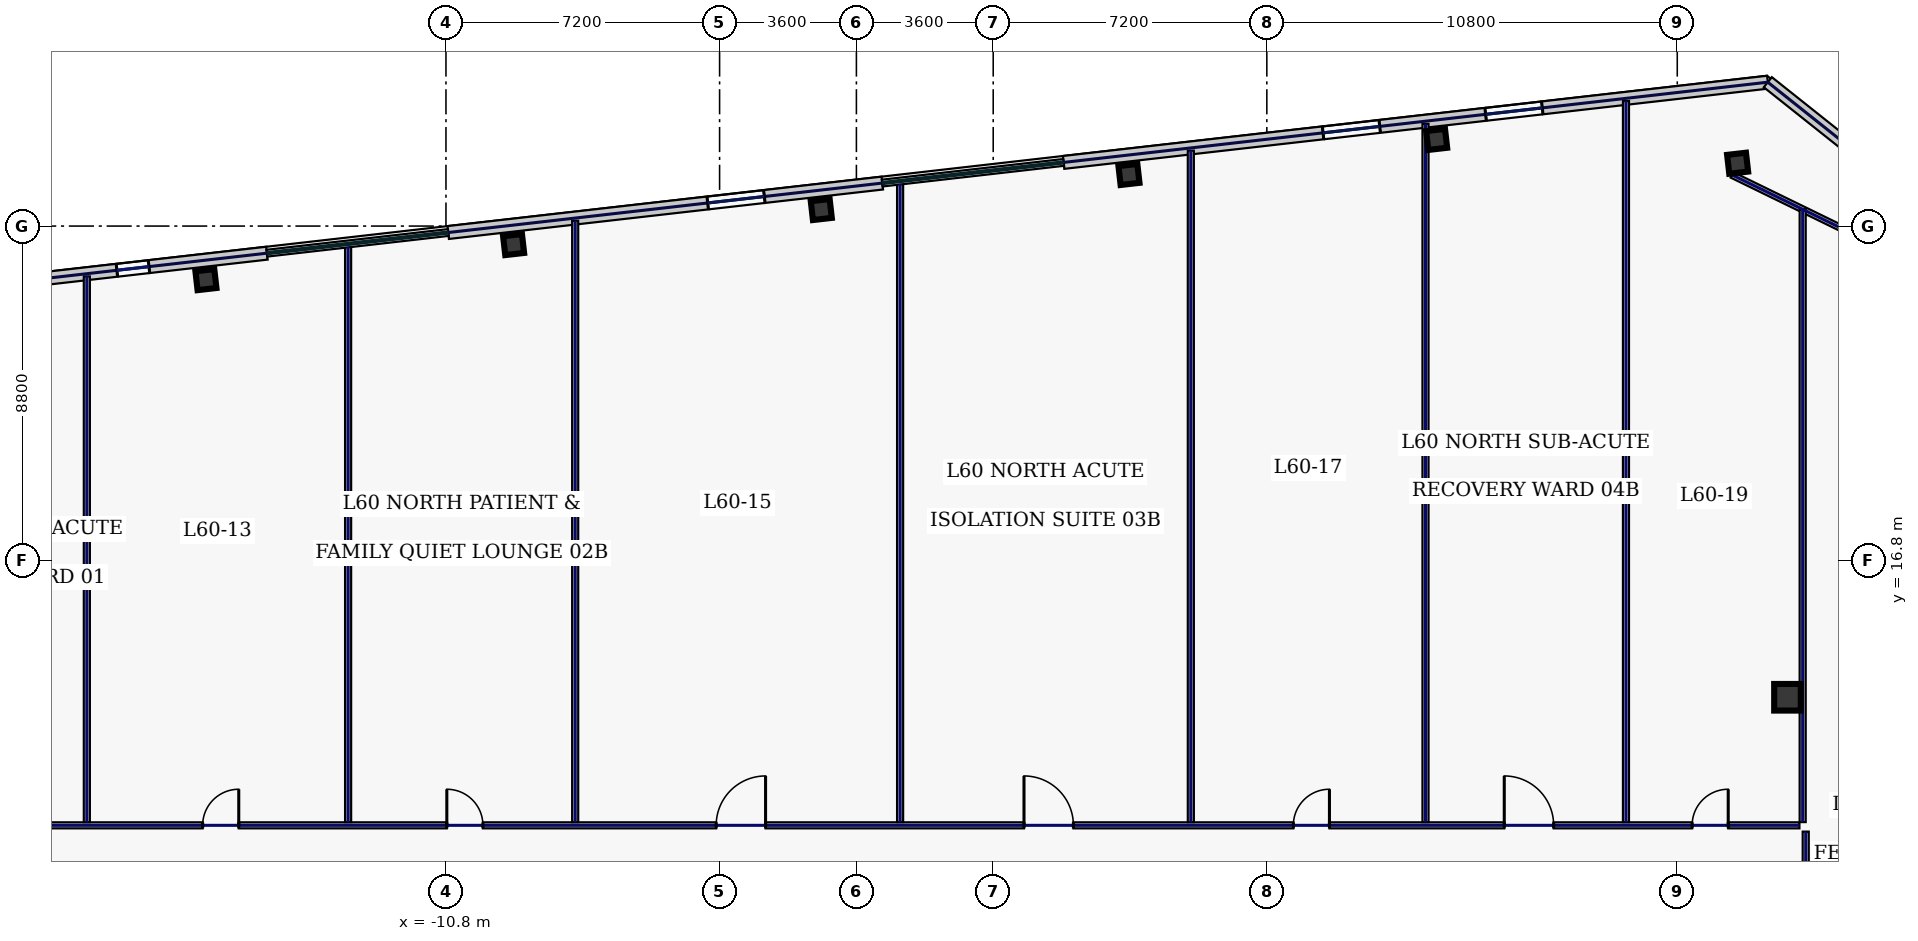
"""IFC4 building model, lengths in metres.
Left out: names, types, materials, properties, quantities, classifications, styles, units other than length and angle.
Written with IfcOpenShell. Run it as: python <this file> out.ifc"""

import sys

from ifc_helpers import new_model, si_unit, direction, frame, frame_2d, origin, origin_2d, place, context, subcontext, project, spatial, rectangle, hollow_rectangle, extrude, element, fill, save


model = new_model("IFC4")
c1 = context("Model", 3, precision=1e-05, world=origin(), true_north=direction((0.0, 1.0)))
c2 = subcontext(c1, "Body", "Model", "MODEL_VIEW")
j1 = project(units=[si_unit("LENGTHUNIT", "METRE"), si_unit("PLANEANGLEUNIT", "RADIAN")], contexts=[c1])
p1 = place(None, origin())
s1 = spatial("IfcSite", under=j1, at=p1, CompositionType="ELEMENT")
p2 = place(p1, origin())
s2 = spatial("IfcBuilding", under=s1, at=p2, CompositionType="ELEMENT")
p3 = place(p2, frame((0.0, 0.0, 259.0)))
s3 = spatial("IfcBuildingStorey", under=s2, at=p3, CompositionType="ELEMENT", Elevation=259.0)
p4 = place(p3, frame((24.5, 13.2, 0.0), z_axis=(0.0, 0.0, 1.0), x_axis=(1.0, 0.0, 0.0)))
e1 = element("IfcColumn", 1, at=p4, inside=s3, PredefinedType="COLUMN", context=c2, shape_type="SweptSolid", body=[
    extrude(hollow_rectangle(XDim=0.7, YDim=0.7, WallThickness=0.032, at=origin_2d()), origin(), (0.0, 0.0, 1.0), 3.74),
])
for number, where, z_axis, x_axis in (
    (2, (23.188, 27.253, 0.0), (0.0, 0.0, 1.0), (0.994, 0.113, 0.0)),
    (3, (15.269, 27.88, 0.0), (0.0, 0.0, 1.0), (0.994, 0.113, 0.0)),
    (4, (7.172, 26.958, 0.0), (0.0, 0.0, 1.0), (0.994, 0.113, 0.0)),
    (5, (-0.924, 26.035, 0.0), (0.0, 0.0, 1.0), (0.994, 0.113, 0.0)),
    (6, (-9.02, 25.113, 0.0), (0.0, 0.0, 1.0), (0.994, 0.113, 0.0)),
    (7, (-17.116, 24.19, 0.0), (0.0, 0.0, 1.0), (0.994, 0.113, 0.0)),
):
    element("IfcColumn", number, at=place(p3, frame(where, z_axis=z_axis, x_axis=x_axis)), inside=s3, PredefinedType="COLUMN", context=c2, shape_type="SweptSolid", body=[
        extrude(hollow_rectangle(XDim=0.5, YDim=0.5, WallThickness=0.025, at=origin_2d()), origin(), (0.0, 0.0, 1.0), 3.74),
    ])
p5 = place(p3, frame((23.983, 29.386, 0.0), z_axis=(0.0, 0.0, 1.0), x_axis=(-0.993572271362, -0.113199565282, 0.0)))
e8 = element("IfcWall", 8, at=p5, inside=s3, PredefinedType="STANDARD", context=c2, shape_type="SweptSolid", body=[
    extrude(rectangle(XDim=18.651, YDim=0.34, at=frame_2d((9.326, 0.0))), origin(), (0.0, 0.0, 1.0), 3.74),
])
p6 = place(p5, frame((10.279, 0.0, 0.83)))
e9 = element("IfcOpeningElement", 9, at=p6, cuts=e8, PredefinedType="OPENING", context=c2, shape_type="SweptSolid", body=[
    extrude(rectangle(XDim=1.5, YDim=2.0, at=frame_2d((0.75, 1.0))), frame((0.0, 0.18, 0.0), z_axis=(0.0, -1.0, 0.0), x_axis=(1.0, 0.0, 0.0)), (0.0, 0.0, 1.0), 0.36),
])
p7 = place(p5, frame((5.973, 0.0, 0.83)))
e10 = element("IfcOpeningElement", 10, at=p7, cuts=e8, PredefinedType="OPENING", context=c2, shape_type="SweptSolid", body=[
    extrude(rectangle(XDim=1.5, YDim=2.0, at=frame_2d((0.75, 1.0))), frame((0.0, 0.18, 0.0), z_axis=(0.0, -1.0, 0.0), x_axis=(1.0, 0.0, 0.0)), (0.0, 0.0, 1.0), 0.36),
])
p8 = place(p3, frame((0.682, 26.731, 0.0), z_axis=(0.0, 0.0, 1.0), x_axis=(-0.993571968199, -0.113202226169, 0.0)))
e11 = element("IfcWall", 11, at=p8, inside=s3, PredefinedType="STANDARD", context=c2, shape_type="SweptSolid", body=[
    extrude(rectangle(XDim=11.497, YDim=0.34, at=frame_2d((5.749, 0.0))), origin(), (0.0, 0.0, 1.0), 3.74),
])
p9 = place(p8, frame((3.125, 0.0, 0.83)))
e12 = element("IfcOpeningElement", 12, at=p9, cuts=e11, PredefinedType="OPENING", context=c2, shape_type="SweptSolid", body=[
    extrude(rectangle(XDim=1.5, YDim=2.0, at=frame_2d((0.75, 1.0))), frame((0.0, 0.18, 0.0), z_axis=(0.0, -1.0, 0.0), x_axis=(1.0, 0.0, 0.0)), (0.0, 0.0, 1.0), 0.36),
])
p10 = place(p3, frame((-15.51, 24.886, 0.0), z_axis=(0.0, 0.0, 1.0), x_axis=(-0.993572271362, -0.113199565282, 0.0)))
e13 = element("IfcWall", 13, at=p10, inside=s3, PredefinedType="STANDARD", context=c2, shape_type="SweptSolid", body=[
    extrude(rectangle(XDim=18.651, YDim=0.34, at=frame_2d((9.326, 0.0))), origin(), (0.0, 0.0, 1.0), 3.74),
])
p11 = place(p10, frame((15.021, 0.0, 0.83)))
e14 = element("IfcOpeningElement", 14, at=p11, cuts=e13, PredefinedType="OPENING", context=c2, shape_type="SweptSolid", body=[
    extrude(rectangle(XDim=1.5, YDim=2.0, at=frame_2d((0.75, 1.0))), frame((0.0, 0.18, 0.0), z_axis=(0.0, -1.0, 0.0), x_axis=(1.0, 0.0, 0.0)), (0.0, 0.0, 1.0), 0.36),
])
p12 = place(p10, frame((11.273, 0.0, 0.83)))
e15 = element("IfcOpeningElement", 15, at=p12, cuts=e13, PredefinedType="OPENING", context=c2, shape_type="SweptSolid", body=[
    extrude(rectangle(XDim=1.5, YDim=2.0, at=frame_2d((0.75, 1.0))), frame((0.0, 0.18, 0.0), z_axis=(0.0, -1.0, 0.0), x_axis=(1.0, 0.0, 0.0)), (0.0, 0.0, 1.0), 0.36),
])
p13 = place(p10, frame((6.873, 0.0, 0.83)))
e16 = element("IfcOpeningElement", 16, at=p13, cuts=e13, PredefinedType="OPENING", context=c2, shape_type="SweptSolid", body=[
    extrude(rectangle(XDim=1.5, YDim=2.0, at=frame_2d((0.75, 1.0))), frame((0.0, 0.18, 0.0), z_axis=(0.0, -1.0, 0.0), x_axis=(1.0, 0.0, 0.0)), (0.0, 0.0, 1.0), 0.36),
])
p14 = place(p10, frame((3.125, 0.0, 0.83)))
e17 = element("IfcOpeningElement", 17, at=p14, cuts=e13, PredefinedType="OPENING", context=c2, shape_type="SweptSolid", body=[
    extrude(rectangle(XDim=0.85, YDim=1.85, at=frame_2d((0.425, 0.925))), frame((0.0, 0.18, 0.0), z_axis=(0.0, -1.0, 0.0), x_axis=(1.0, 0.0, 0.0)), (0.0, 0.0, 1.0), 0.36),
])
p15 = place(p3, frame((29.107, 25.31, 0.0), z_axis=(0.0, 0.0, 1.0), x_axis=(-0.78259733853, 0.62252823689, 0.0)))
e18 = element("IfcWall", 18, at=p15, inside=s3, PredefinedType="STANDARD", context=c2, shape_type="SweptSolid", body=[
    extrude(rectangle(XDim=6.548, YDim=0.34, at=frame_2d((3.274, 0.0))), origin(), (0.0, 0.0, 1.0), 3.74),
])
p16 = place(p3, frame((28.528, 24.271, 0.0), z_axis=(0.0, 0.0, 1.0), x_axis=(-0.898820692789, 0.438316509173, 0.0)))
e19 = element("IfcWall", 19, at=p16, inside=s3, PredefinedType="PARTITIONING", context=c2, shape_type="SweptSolid", body=[
    extrude(rectangle(XDim=6.107, YDim=0.16, at=frame_2d((3.053, 0.0))), origin(), (0.0, 0.0, 1.0), 3.74),
])
p17 = place(p3, frame((-24.815, 9.83, 0.0), z_axis=(0.0, 0.0, 1.0), x_axis=(1.0, 0.0, 0.0)))
e20 = element("IfcWall", 20, at=p17, inside=s3, PredefinedType="PARTITIONING", context=c2, shape_type="SweptSolid", body=[
    extrude(rectangle(XDim=49.63, YDim=0.16, at=frame_2d((24.815, 0.0))), origin(), (0.0, 0.0, 1.0), 3.74),
])
p18 = place(p17, frame((1.869, 0.0, 0.0)))
e21 = element("IfcOpeningElement", 21, at=p18, cuts=e20, PredefinedType="OPENING", context=c2, shape_type="SweptSolid", body=[
    extrude(rectangle(XDim=1.3, YDim=2.2, at=frame_2d((0.65, 1.1))), frame((0.0, 0.09, 0.0), z_axis=(0.0, -1.0, 0.0), x_axis=(1.0, 0.0, 0.0)), (0.0, 0.0, 1.0), 0.18),
])
p19 = place(p17, frame((7.613, 0.0, 0.0)))
e22 = element("IfcOpeningElement", 22, at=p19, cuts=e20, PredefinedType="OPENING", context=c2, shape_type="SweptSolid", body=[
    extrude(rectangle(XDim=0.95, YDim=2.2, at=frame_2d((0.475, 1.1))), frame((0.0, 0.09, 0.0), z_axis=(0.0, -1.0, 0.0), x_axis=(1.0, 0.0, 0.0)), (0.0, 0.0, 1.0), 0.18),
])
p20 = place(p17, frame((14.038, 0.0, 0.0)))
e23 = element("IfcOpeningElement", 23, at=p20, cuts=e20, PredefinedType="OPENING", context=c2, shape_type="SweptSolid", body=[
    extrude(rectangle(XDim=0.95, YDim=2.2, at=frame_2d((0.475, 1.1))), frame((0.0, 0.09, 0.0), z_axis=(0.0, -1.0, 0.0), x_axis=(1.0, 0.0, 0.0)), (0.0, 0.0, 1.0), 0.18),
])
p21 = place(p17, frame((21.125, 0.0, 0.0)))
e24 = element("IfcOpeningElement", 24, at=p21, cuts=e20, PredefinedType="OPENING", context=c2, shape_type="SweptSolid", body=[
    extrude(rectangle(XDim=1.3, YDim=2.2, at=frame_2d((0.65, 1.1))), frame((0.0, 0.09, 0.0), z_axis=(0.0, -1.0, 0.0), x_axis=(1.0, 0.0, 0.0)), (0.0, 0.0, 1.0), 0.18),
])
p22 = place(p17, frame((29.225, 0.0, 0.0)))
e25 = element("IfcOpeningElement", 25, at=p22, cuts=e20, PredefinedType="OPENING", context=c2, shape_type="SweptSolid", body=[
    extrude(rectangle(XDim=1.3, YDim=2.2, at=frame_2d((0.65, 1.1))), frame((0.0, 0.09, 0.0), z_axis=(0.0, -1.0, 0.0), x_axis=(1.0, 0.0, 0.0)), (0.0, 0.0, 1.0), 0.18),
])
p23 = place(p17, frame((36.312, 0.0, 0.0)))
e26 = element("IfcOpeningElement", 26, at=p23, cuts=e20, PredefinedType="OPENING", context=c2, shape_type="SweptSolid", body=[
    extrude(rectangle(XDim=0.95, YDim=2.2, at=frame_2d((0.475, 1.1))), frame((0.0, 0.09, 0.0), z_axis=(0.0, -1.0, 0.0), x_axis=(1.0, 0.0, 0.0)), (0.0, 0.0, 1.0), 0.18),
])
p24 = place(p17, frame((41.863, 0.0, 0.0)))
e27 = element("IfcOpeningElement", 27, at=p24, cuts=e20, PredefinedType="OPENING", context=c2, shape_type="SweptSolid", body=[
    extrude(rectangle(XDim=1.3, YDim=2.2, at=frame_2d((0.65, 1.1))), frame((0.0, 0.09, 0.0), z_axis=(0.0, -1.0, 0.0), x_axis=(1.0, 0.0, 0.0)), (0.0, 0.0, 1.0), 0.18),
])
p25 = place(p17, frame((46.806, 0.0, 0.0)))
e28 = element("IfcOpeningElement", 28, at=p25, cuts=e20, PredefinedType="OPENING", context=c2, shape_type="SweptSolid", body=[
    extrude(rectangle(XDim=0.95, YDim=2.2, at=frame_2d((0.475, 1.1))), frame((0.0, 0.09, 0.0), z_axis=(0.0, -1.0, 0.0), x_axis=(1.0, 0.0, 0.0)), (0.0, 0.0, 1.0), 0.18),
])
p26 = place(p3, frame((24.98, 9.665, 0.0), z_axis=(0.0, 0.0, 1.0), x_axis=(0.0, -1.0, 0.0)))
e29 = element("IfcWall", 29, at=p26, inside=s3, PredefinedType="PARTITIONING", context=c2, shape_type="SweptSolid", body=[
    extrude(rectangle(XDim=19.28, YDim=0.16, at=frame_2d((9.64, 0.0))), origin(), (0.0, 0.0, 1.0), 3.74),
])
p27 = place(p26, frame((16.531, 0.0, 0.0)))
e30 = element("IfcOpeningElement", 30, at=p27, cuts=e29, PredefinedType="OPENING", context=c2, shape_type="SweptSolid", body=[
    extrude(rectangle(XDim=0.95, YDim=2.2, at=frame_2d((0.475, 1.1))), frame((0.0, 0.09, 0.0), z_axis=(0.0, -1.0, 0.0), x_axis=(1.0, 0.0, 0.0)), (0.0, 0.0, 1.0), 0.18),
])
p28 = place(p26, frame((11.25, 0.0, 0.0)))
e31 = element("IfcOpeningElement", 31, at=p28, cuts=e29, PredefinedType="OPENING", context=c2, shape_type="SweptSolid", body=[
    extrude(rectangle(XDim=0.95, YDim=2.2, at=frame_2d((0.475, 1.1))), frame((0.0, 0.09, 0.0), z_axis=(0.0, -1.0, 0.0), x_axis=(1.0, 0.0, 0.0)), (0.0, 0.0, 1.0), 0.18),
])
p29 = place(p26, frame((6.05, 0.0, 0.0)))
e32 = element("IfcOpeningElement", 32, at=p29, cuts=e29, PredefinedType="OPENING", context=c2, shape_type="SweptSolid", body=[
    extrude(rectangle(XDim=0.95, YDim=2.2, at=frame_2d((0.475, 1.1))), frame((0.0, 0.09, 0.0), z_axis=(0.0, -1.0, 0.0), x_axis=(1.0, 0.0, 0.0)), (0.0, 0.0, 1.0), 0.18),
])
p30 = place(p26, frame((1.994, 0.0, 0.0)))
e33 = element("IfcOpeningElement", 33, at=p30, cuts=e29, PredefinedType="OPENING", context=c2, shape_type="SweptSolid", body=[
    extrude(rectangle(XDim=0.95, YDim=2.2, at=frame_2d((0.475, 1.1))), frame((0.0, 0.09, 0.0), z_axis=(0.0, -1.0, 0.0), x_axis=(1.0, 0.0, 0.0)), (0.0, 0.0, 1.0), 0.18),
])
p31 = place(p3, frame((24.9, 9.915, 0.0), z_axis=(0.0, 0.0, 1.0), x_axis=(0.0, 1.0, 0.0)))
e34 = element("IfcWall", 34, at=p31, inside=s3, PredefinedType="PARTITIONING", context=c2, shape_type="SweptSolid", body=[
    extrude(rectangle(XDim=16.129, YDim=0.16, at=frame_2d((8.065, 0.0))), origin(), (0.0, 0.0, 1.0), 3.74),
])
p32 = place(p3, frame((-20.25, 9.915, 0.0), z_axis=(0.0, 0.0, 1.0), x_axis=(0.0, 1.0, 0.0)))
e35 = element("IfcWall", 35, at=p32, inside=s3, PredefinedType="PARTITIONING", context=c2, shape_type="SweptSolid", body=[
    extrude(rectangle(XDim=14.361, YDim=0.16, at=frame_2d((7.181, 0.0))), origin(), (0.0, 0.0, 1.0), 3.74),
])
p33 = place(p3, frame((-7.4, 9.915, 0.0), z_axis=(0.0, 0.0, 1.0), x_axis=(0.0, 1.0, 0.0)))
e36 = element("IfcWall", 36, at=p33, inside=s3, PredefinedType="PARTITIONING", context=c2, shape_type="SweptSolid", body=[
    extrude(rectangle(XDim=15.825, YDim=0.16, at=frame_2d((7.913, 0.0))), origin(), (0.0, 0.0, 1.0), 3.74),
])
p34 = place(p3, frame((8.8, 9.915, 0.0), z_axis=(0.0, 0.0, 1.0), x_axis=(0.0, 1.0, 0.0)))
e37 = element("IfcWall", 37, at=p34, inside=s3, PredefinedType="PARTITIONING", context=c2, shape_type="SweptSolid", body=[
    extrude(rectangle(XDim=17.671, YDim=0.16, at=frame_2d((8.835, 0.0))), origin(), (0.0, 0.0, 1.0), 3.74),
])
p35 = place(p3, frame((20.25, 9.915, 0.0), z_axis=(0.0, 0.0, 1.0), x_axis=(0.0, 1.0, 0.0)))
e38 = element("IfcWall", 38, at=p35, inside=s3, PredefinedType="PARTITIONING", context=c2, shape_type="SweptSolid", body=[
    extrude(rectangle(XDim=18.975, YDim=0.16, at=frame_2d((9.488, 0.0))), origin(), (0.0, 0.0, 1.0), 3.74),
])
p36 = place(p3, frame((-13.375, 9.915, 0.0), z_axis=(0.0, 0.0, 1.0), x_axis=(0.0, 1.0, 0.0)))
e39 = element("IfcWall", 39, at=p36, inside=s3, PredefinedType="PARTITIONING", context=c2, shape_type="SweptSolid", body=[
    extrude(rectangle(XDim=15.144, YDim=0.16, at=frame_2d((7.572, 0.0))), origin(), (0.0, 0.0, 1.0), 3.74),
])
p37 = place(p3, frame((1.15, 9.915, 0.0), z_axis=(0.0, 0.0, 1.0), x_axis=(0.0, 1.0, 0.0)))
e40 = element("IfcWall", 40, at=p37, inside=s3, PredefinedType="PARTITIONING", context=c2, shape_type="SweptSolid", body=[
    extrude(rectangle(XDim=16.799, YDim=0.16, at=frame_2d((8.4, 0.0))), origin(), (0.0, 0.0, 1.0), 3.74),
])
p38 = place(p3, frame((14.975, 9.915, 0.0), z_axis=(0.0, 0.0, 1.0), x_axis=(0.0, 1.0, 0.0)))
e41 = element("IfcWall", 41, at=p38, inside=s3, PredefinedType="PARTITIONING", context=c2, shape_type="SweptSolid", body=[
    extrude(rectangle(XDim=18.375, YDim=0.16, at=frame_2d((9.187, 0.0))), origin(), (0.0, 0.0, 1.0), 3.74),
])
p39 = place(p6, origin())
e42 = element("IfcWindow", 42, at=p39, inside=s3, PartitioningType="SINGLE_PANEL", PredefinedType="WINDOW", context=c2, shape_type="SweptSolid", body=[
    extrude(rectangle(XDim=1.5, YDim=2.0, at=frame_2d((0.75, 1.0))), frame((0.0, 0.03, 0.0), z_axis=(0.0, -1.0, 0.0), x_axis=(1.0, 0.0, 0.0)), (0.0, 0.0, 1.0), 0.06),
])
fill(e9, e42)
p40 = place(p7, origin())
e43 = element("IfcWindow", 43, at=p40, inside=s3, PartitioningType="SINGLE_PANEL", PredefinedType="WINDOW", context=c2, shape_type="SweptSolid", body=[
    extrude(rectangle(XDim=1.5, YDim=2.0, at=frame_2d((0.75, 1.0))), frame((0.0, 0.03, 0.0), z_axis=(0.0, -1.0, 0.0), x_axis=(1.0, 0.0, 0.0)), (0.0, 0.0, 1.0), 0.06),
])
fill(e10, e43)
p41 = place(p9, origin())
e44 = element("IfcWindow", 44, at=p41, inside=s3, PartitioningType="SINGLE_PANEL", PredefinedType="WINDOW", context=c2, shape_type="SweptSolid", body=[
    extrude(rectangle(XDim=1.5, YDim=2.0, at=frame_2d((0.75, 1.0))), frame((0.0, 0.03, 0.0), z_axis=(0.0, -1.0, 0.0), x_axis=(1.0, 0.0, 0.0)), (0.0, 0.0, 1.0), 0.06),
])
fill(e12, e44)
p42 = place(p14, origin())
e45 = element("IfcWindow", 45, at=p42, inside=s3, PartitioningType="SINGLE_PANEL", PredefinedType="WINDOW", context=c2, shape_type="SweptSolid", body=[
    extrude(rectangle(XDim=0.85, YDim=1.85, at=frame_2d((0.425, 0.925))), frame((0.0, 0.03, 0.0), z_axis=(0.0, -1.0, 0.0), x_axis=(1.0, 0.0, 0.0)), (0.0, 0.0, 1.0), 0.06),
])
fill(e17, e45)
p43 = place(p19, origin())
e46 = element("IfcDoor", 46, at=p43, inside=s3, OperationType="SINGLE_SWING_RIGHT", PredefinedType="DOOR", context=c2, shape_type="SweptSolid", body=[
    extrude(rectangle(XDim=0.95, YDim=2.2, at=frame_2d((0.475, 1.1))), frame((0.0, 0.025, 0.0), z_axis=(0.0, -1.0, 0.0), x_axis=(1.0, 0.0, 0.0)), (0.0, 0.0, 1.0), 0.05),
])
fill(e22, e46)
p44 = place(p20, origin())
e47 = element("IfcDoor", 47, at=p44, inside=s3, OperationType="SINGLE_SWING_LEFT", PredefinedType="DOOR", context=c2, shape_type="SweptSolid", body=[
    extrude(rectangle(XDim=0.95, YDim=2.2, at=frame_2d((0.475, 1.1))), frame((0.0, 0.025, 0.0), z_axis=(0.0, -1.0, 0.0), x_axis=(1.0, 0.0, 0.0)), (0.0, 0.0, 1.0), 0.05),
])
fill(e23, e47)
p45 = place(p21, origin())
e48 = element("IfcDoor", 48, at=p45, inside=s3, OperationType="SINGLE_SWING_RIGHT", PredefinedType="DOOR", context=c2, shape_type="SweptSolid", body=[
    extrude(rectangle(XDim=1.3, YDim=2.2, at=frame_2d((0.65, 1.1))), frame((0.0, 0.025, 0.0), z_axis=(0.0, -1.0, 0.0), x_axis=(1.0, 0.0, 0.0)), (0.0, 0.0, 1.0), 0.05),
])
fill(e24, e48)
p46 = place(p22, origin())
e49 = element("IfcDoor", 49, at=p46, inside=s3, OperationType="SINGLE_SWING_LEFT", PredefinedType="DOOR", context=c2, shape_type="SweptSolid", body=[
    extrude(rectangle(XDim=1.3, YDim=2.2, at=frame_2d((0.65, 1.1))), frame((0.0, 0.025, 0.0), z_axis=(0.0, -1.0, 0.0), x_axis=(1.0, 0.0, 0.0)), (0.0, 0.0, 1.0), 0.05),
])
fill(e25, e49)
p47 = place(p23, origin())
e50 = element("IfcDoor", 50, at=p47, inside=s3, OperationType="SINGLE_SWING_RIGHT", PredefinedType="DOOR", context=c2, shape_type="SweptSolid", body=[
    extrude(rectangle(XDim=0.95, YDim=2.2, at=frame_2d((0.475, 1.1))), frame((0.0, 0.025, 0.0), z_axis=(0.0, -1.0, 0.0), x_axis=(1.0, 0.0, 0.0)), (0.0, 0.0, 1.0), 0.05),
])
fill(e26, e50)
p48 = place(p24, origin())
e51 = element("IfcDoor", 51, at=p48, inside=s3, OperationType="SINGLE_SWING_LEFT", PredefinedType="DOOR", context=c2, shape_type="SweptSolid", body=[
    extrude(rectangle(XDim=1.3, YDim=2.2, at=frame_2d((0.65, 1.1))), frame((0.0, 0.025, 0.0), z_axis=(0.0, -1.0, 0.0), x_axis=(1.0, 0.0, 0.0)), (0.0, 0.0, 1.0), 0.05),
])
fill(e27, e51)
p49 = place(p25, origin())
e52 = element("IfcDoor", 52, at=p49, inside=s3, OperationType="SINGLE_SWING_RIGHT", PredefinedType="DOOR", context=c2, shape_type="SweptSolid", body=[
    extrude(rectangle(XDim=0.95, YDim=2.2, at=frame_2d((0.475, 1.1))), frame((0.0, 0.025, 0.0), z_axis=(0.0, -1.0, 0.0), x_axis=(1.0, 0.0, 0.0)), (0.0, 0.0, 1.0), 0.05),
])
fill(e28, e52)
save(model, sys.argv[1])
